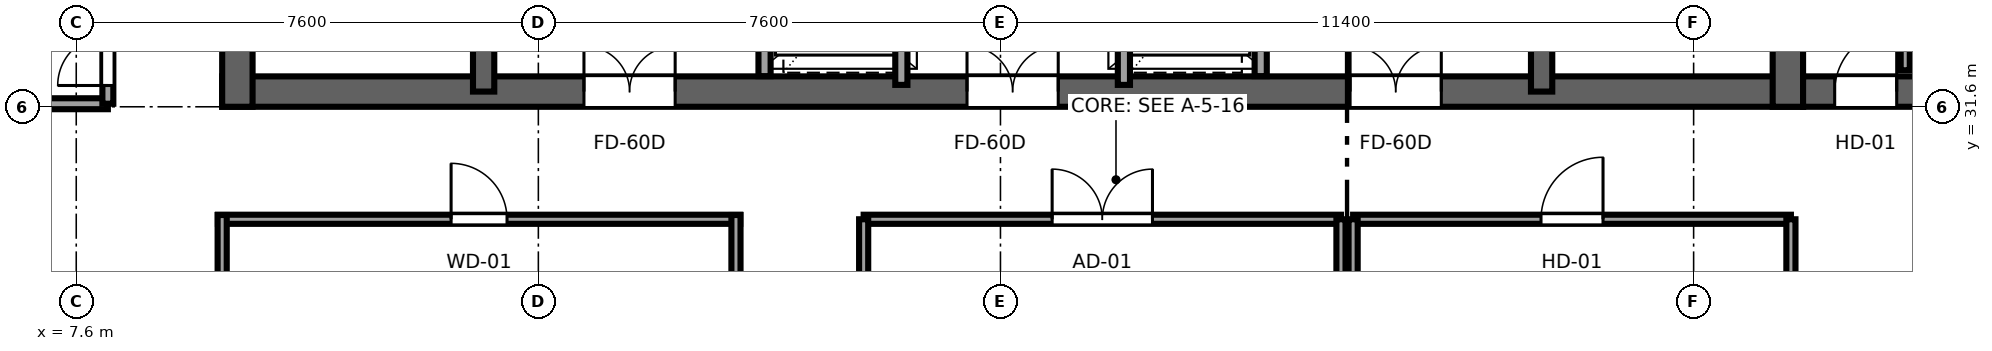
"""IFC4 building model, lengths in metres.
Left out: names, types, materials, properties, quantities, classifications, styles, units other than length and angle.
Written with IfcOpenShell. Run it as: python <this file> out.ifc"""

import sys

from ifc_helpers import new_model, si_unit, direction, frame, frame_2d, origin, place, context, subcontext, project, spatial, rectangle, extrude, source, transform, mapped, element, fill, save


model = new_model("IFC4")
c1 = context("Model", 3, precision=1e-05, world=origin(), true_north=direction((0.0, 1.0)))
c2 = subcontext(c1, "Body", "Model", "MODEL_VIEW")
j1 = project(units=[si_unit("LENGTHUNIT", "METRE"), si_unit("PLANEANGLEUNIT", "RADIAN")], contexts=[c1])
p1 = place(None, origin())
s1 = spatial("IfcSite", under=j1, at=p1, CompositionType="ELEMENT")
p2 = place(p1, origin())
s2 = spatial("IfcBuilding", under=s1, at=p2, CompositionType="ELEMENT")
p3 = place(p2, frame((0.0, 0.0, 238.1)))
s3 = spatial("IfcBuildingStorey", under=s2, at=p3, CompositionType="ELEMENT", Elevation=238.1)
p4 = place(p3, frame((10.0, 31.85, 0.0), z_axis=(0.0, 0.0, 1.0), x_axis=(1.0, 0.0, 0.0)))
e1 = element("IfcWall", 1, at=p4, inside=s3, PredefinedType="SHEAR", context=c2, shape_type="SweptSolid", body=[
    extrude(rectangle(XDim=26.0, YDim=0.5, at=frame_2d((13.0, 0.0))), origin(), (0.0, 0.0, 1.0), 3.55),
])
p5 = place(p4, frame((7.45, 0.0, 0.0), z_axis=(0.0, 0.0, 1.0), x_axis=(-1.0, 0.0, 0.0)))
e2 = element("IfcOpeningElement", 2, at=p5, cuts=e1, PredefinedType="OPENING", context=c2, shape_type="SweptSolid", body=[
    extrude(rectangle(XDim=1.5, YDim=2.04, at=frame_2d((0.75, 1.02))), frame((0.0, 0.26, 0.0), z_axis=(0.0, -1.0, 0.0), x_axis=(1.0, 0.0, 0.0)), (0.0, 0.0, 1.0), 0.52),
])
p6 = place(p4, frame((13.75, 0.0, 0.0), z_axis=(0.0, 0.0, 1.0), x_axis=(-1.0, 0.0, 0.0)))
e3 = element("IfcOpeningElement", 3, at=p6, cuts=e1, PredefinedType="OPENING", context=c2, shape_type="SweptSolid", body=[
    extrude(rectangle(XDim=1.5, YDim=2.04, at=frame_2d((0.75, 1.02))), frame((0.0, 0.26, 0.0), z_axis=(0.0, -1.0, 0.0), x_axis=(1.0, 0.0, 0.0)), (0.0, 0.0, 1.0), 0.52),
])
p7 = place(p4, frame((20.05, 0.0, 0.0), z_axis=(0.0, 0.0, 1.0), x_axis=(-1.0, 0.0, 0.0)))
e4 = element("IfcOpeningElement", 4, at=p7, cuts=e1, PredefinedType="OPENING", context=c2, shape_type="SweptSolid", body=[
    extrude(rectangle(XDim=1.5, YDim=2.04, at=frame_2d((0.75, 1.02))), frame((0.0, 0.26, 0.0), z_axis=(0.0, -1.0, 0.0), x_axis=(1.0, 0.0, 0.0)), (0.0, 0.0, 1.0), 0.52),
])
for number, where, z_axis, x_axis in (
    (5, (10.25, 31.6, 0.0), (0.0, 0.0, 1.0), (0.0, 1.0, 0.0)),
    (6, (35.75, 31.6, 0.0), (0.0, 0.0, 1.0), (0.0, 1.0, 0.0)),
):
    element("IfcWall", number, at=place(p3, frame(where, z_axis=z_axis, x_axis=x_axis)), inside=s3, PredefinedType="SHEAR", context=c2, shape_type="SweptSolid", body=[
        extrude(rectangle(XDim=13.6, YDim=0.5, at=frame_2d((6.8, 0.0))), origin(), (0.0, 0.0, 1.0), 3.55),
    ])
p8 = place(p3, frame((14.3, 31.85, 0.0), z_axis=(0.0, 0.0, 1.0), x_axis=(0.0, 1.0, 0.0)))
e7 = element("IfcWall", 7, at=p8, inside=s3, PredefinedType="SHEAR", context=c2, shape_type="SweptSolid", body=[
    extrude(rectangle(XDim=13.1, YDim=0.35, at=frame_2d((6.55, 0.0))), origin(), (0.0, 0.0, 1.0), 3.55),
])
p9 = place(p8, frame((0.7, 0.0, 0.0)))
e8 = element("IfcOpeningElement", 8, at=p9, cuts=e7, PredefinedType="OPENING", context=c2, shape_type="SweptSolid", body=[
    extrude(rectangle(XDim=1.1, YDim=2.12, at=frame_2d((0.55, 1.06))), frame((0.0, 0.185, 0.0), z_axis=(0.0, -1.0, 0.0), x_axis=(1.0, 0.0, 0.0)), (0.0, 0.0, 1.0), 0.37),
])
p10 = place(p3, frame((31.7, 31.85, 0.0), z_axis=(0.0, 0.0, 1.0), x_axis=(0.0, 1.0, 0.0)))
e9 = element("IfcWall", 9, at=p10, inside=s3, PredefinedType="SHEAR", context=c2, shape_type="SweptSolid", body=[
    extrude(rectangle(XDim=13.1, YDim=0.35, at=frame_2d((6.55, 0.0))), origin(), (0.0, 0.0, 1.0), 3.55),
])
p11 = place(p10, frame((1.8, 0.0, 0.0), z_axis=(0.0, 0.0, 1.0), x_axis=(-1.0, 0.0, 0.0)))
e10 = element("IfcOpeningElement", 10, at=p11, cuts=e9, PredefinedType="OPENING", context=c2, shape_type="SweptSolid", body=[
    extrude(rectangle(XDim=1.1, YDim=2.12, at=frame_2d((0.55, 1.06))), frame((0.0, 0.185, 0.0), z_axis=(0.0, -1.0, 0.0), x_axis=(1.0, 0.0, 0.0)), (0.0, 0.0, 1.0), 0.37),
])
p12 = place(p3, frame((36.0, 31.85, 0.0), z_axis=(0.0, 0.0, 1.0), x_axis=(1.0, 0.0, 0.0)))
e11 = element("IfcWall", 11, at=p12, inside=s3, PredefinedType="SHEAR", context=c2, shape_type="SweptSolid", body=[
    extrude(rectangle(XDim=3.8, YDim=0.5, at=frame_2d((1.9, 0.0))), origin(), (0.0, 0.0, 1.0), 3.55),
])
p13 = place(p12, frame((1.54, 0.0, 0.0), z_axis=(0.0, 0.0, 1.0), x_axis=(-1.0, 0.0, 0.0)))
e12 = element("IfcOpeningElement", 12, at=p13, cuts=e11, PredefinedType="OPENING", context=c2, shape_type="SweptSolid", body=[
    extrude(rectangle(XDim=1.02, YDim=2.03, at=frame_2d((0.51, 1.015))), frame((0.0, 0.26, 0.0), z_axis=(0.0, -1.0, 0.0), x_axis=(1.0, 0.0, 0.0)), (0.0, 0.0, 1.0), 0.52),
])
for number, where, z_axis, x_axis in (
    (13, (18.92, 32.104, 0.0), (0.0, 0.0, 1.0), (0.0, 1.0, 0.0)),
    (14, (27.08, 32.104, 0.0), (0.0, 0.0, 1.0), (0.0, 1.0, 0.0)),
):
    element("IfcWall", number, at=place(p3, frame(where, z_axis=z_axis, x_axis=x_axis)), inside=s3, PredefinedType="SOLIDWALL", context=c2, shape_type="SweptSolid", body=[
        extrude(rectangle(XDim=4.046, YDim=0.2, at=frame_2d((2.023, 0.0))), origin(), (0.0, 0.0, 1.0), 3.29),
    ])
p14 = place(p3, frame((21.17, 31.96, 0.0), z_axis=(0.0, 0.0, 1.0), x_axis=(0.0, 1.0, 0.0)))
e15 = element("IfcWall", 15, at=p14, inside=s3, PredefinedType="SOLIDWALL", context=c2, shape_type="SweptSolid", body=[
    extrude(rectangle(XDim=5.08, YDim=0.2, at=frame_2d((2.54, 0.0))), origin(), (0.0, 0.0, 1.0), 3.29),
])
p15 = place(p14, frame((0.74, 0.0, 0.0)))
e16 = element("IfcOpeningElement", 16, at=p15, cuts=e15, PredefinedType="OPENING", context=c2, shape_type="SweptSolid", body=[
    extrude(rectangle(XDim=1.1, YDim=2.12, at=frame_2d((0.55, 1.06))), frame((0.0, 0.11, 0.0), z_axis=(0.0, -1.0, 0.0), x_axis=(1.0, 0.0, 0.0)), (0.0, 0.0, 1.0), 0.22),
])
p16 = place(p14, frame((3.24, 0.0, 0.0)))
e17 = element("IfcOpeningElement", 17, at=p16, cuts=e15, PredefinedType="OPENING", context=c2, shape_type="SweptSolid", body=[
    extrude(rectangle(XDim=1.1, YDim=2.12, at=frame_2d((0.55, 1.06))), frame((0.0, 0.11, 0.0), z_axis=(0.0, -1.0, 0.0), x_axis=(1.0, 0.0, 0.0)), (0.0, 0.0, 1.0), 0.22),
])
p17 = place(p3, frame((24.83, 31.96, 0.0), z_axis=(0.0, 0.0, 1.0), x_axis=(0.0, 1.0, 0.0)))
e18 = element("IfcWall", 18, at=p17, inside=s3, PredefinedType="SOLIDWALL", context=c2, shape_type="SweptSolid", body=[
    extrude(rectangle(XDim=5.08, YDim=0.2, at=frame_2d((2.54, 0.0))), origin(), (0.0, 0.0, 1.0), 3.29),
])
p18 = place(p17, frame((0.74, 0.0, 0.0)))
e19 = element("IfcOpeningElement", 19, at=p18, cuts=e18, PredefinedType="OPENING", context=c2, shape_type="SweptSolid", body=[
    extrude(rectangle(XDim=1.1, YDim=2.12, at=frame_2d((0.55, 1.06))), frame((0.0, 0.11, 0.0), z_axis=(0.0, -1.0, 0.0), x_axis=(1.0, 0.0, 0.0)), (0.0, 0.0, 1.0), 0.22),
])
p19 = place(p17, frame((3.24, 0.0, 0.0)))
e20 = element("IfcOpeningElement", 20, at=p19, cuts=e18, PredefinedType="OPENING", context=c2, shape_type="SweptSolid", body=[
    extrude(rectangle(XDim=1.1, YDim=2.12, at=frame_2d((0.55, 1.06))), frame((0.0, 0.11, 0.0), z_axis=(0.0, -1.0, 0.0), x_axis=(1.0, 0.0, 0.0)), (0.0, 0.0, 1.0), 0.22),
])
p20 = place(p3, frame((37.68, 32.2, 0.0), z_axis=(0.0, 0.0, 1.0), x_axis=(0.0, 1.0, 0.0)))
e21 = element("IfcWall", 21, at=p20, inside=s3, PredefinedType="PARTITIONING", context=c2, shape_type="SweptSolid", body=[
    extrude(rectangle(XDim=6.0, YDim=0.15, at=frame_2d((3.0, 0.0))), origin(), (0.0, 0.0, 1.0), 3.29),
])
p21 = place(p20, frame((2.49, 0.0, 0.0)))
e22 = element("IfcOpeningElement", 22, at=p21, cuts=e21, PredefinedType="OPENING", context=c2, shape_type="SweptSolid", body=[
    extrude(rectangle(XDim=1.02, YDim=2.03, at=frame_2d((0.51, 1.015))), frame((0.0, 0.085, 0.0), z_axis=(0.0, -1.0, 0.0), x_axis=(1.0, 0.0, 0.0)), (0.0, 0.0, 1.0), 0.17),
])
p22 = place(p3, frame((3.005, 31.65, 0.0), z_axis=(0.0, 0.0, 1.0), x_axis=(1.0, 0.0, 0.0)))
e23 = element("IfcWall", 23, at=p22, inside=s3, PredefinedType="PARTITIONING", context=c2, shape_type="SweptSolid", body=[
    extrude(rectangle(XDim=5.115, YDim=0.18, at=frame_2d((2.558, 0.0))), origin(), (0.0, 0.0, 1.0), 3.29),
])
p23 = place(p3, frame((8.12, 31.65, 0.0), z_axis=(0.0, 0.0, 1.0), x_axis=(0.0, 1.0, 0.0)))
e24 = element("IfcWall", 24, at=p23, inside=s3, PredefinedType="PARTITIONING", context=c2, shape_type="SweptSolid", body=[
    extrude(rectangle(XDim=4.95, YDim=0.18, at=frame_2d((2.475, 0.0))), origin(), (0.0, 0.0, 1.0), 2.08),
])
p24 = place(p23, frame((0.3, 0.0, 0.0)))
e25 = element("IfcOpeningElement", 25, at=p24, cuts=e24, PredefinedType="OPENING", context=c2, shape_type="SweptSolid", body=[
    extrude(rectangle(XDim=1.65, YDim=2.15, at=frame_2d((0.825, 1.075))), frame((0.0, 0.1, 0.0), z_axis=(0.0, -1.0, 0.0), x_axis=(1.0, 0.0, 0.0)), (0.0, 0.0, 1.0), 0.2),
])
p25 = place(p3, frame((9.93, 29.75, 0.0), z_axis=(0.0, 0.0, 1.0), x_axis=(1.0, 0.0, 0.0)))
e26 = element("IfcWall", 26, at=p25, inside=s3, PredefinedType="PARTITIONING", context=c2, shape_type="SweptSolid", body=[
    extrude(rectangle(XDim=8.59, YDim=0.15, at=frame_2d((4.295, 0.0))), origin(), (0.0, 0.0, 1.0), 3.29),
])
p26 = place(p25, frame((3.835, 0.0, 0.0)))
e27 = element("IfcOpeningElement", 27, at=p26, cuts=e26, PredefinedType="OPENING", context=c2, shape_type="SweptSolid", body=[
    extrude(rectangle(XDim=0.92, YDim=2.01, at=frame_2d((0.46, 1.005))), frame((0.0, 0.085, 0.0), z_axis=(0.0, -1.0, 0.0), x_axis=(1.0, 0.0, 0.0)), (0.0, 0.0, 1.0), 0.17),
])
for number, where, z_axis, x_axis in (
    (28, (10.0, 27.03, 0.0), (0.0, 0.0, 1.0), (0.0, 1.0, 0.0)),
    (29, (18.45, 27.03, 0.0), (0.0, 0.0, 1.0), (0.0, 1.0, 0.0)),
):
    element("IfcWall", number, at=place(p3, frame(where, z_axis=z_axis, x_axis=x_axis)), inside=s3, PredefinedType="PARTITIONING", context=c2, shape_type="SweptSolid", body=[
        extrude(rectangle(XDim=2.79, YDim=0.15, at=frame_2d((1.395, 0.0))), origin(), (0.0, 0.0, 1.0), 3.29),
    ])
p27 = place(p3, frame((20.55, 29.75, 0.0), z_axis=(0.0, 0.0, 1.0), x_axis=(1.0, 0.0, 0.0)))
e30 = element("IfcWall", 30, at=p27, inside=s3, PredefinedType="PARTITIONING", context=c2, shape_type="SweptSolid", body=[
    extrude(rectangle(XDim=7.85, YDim=0.15, at=frame_2d((3.925, 0.0))), origin(), (0.0, 0.0, 1.0), 3.29),
])
p28 = place(p27, frame((3.1, 0.0, 0.0)))
e31 = element("IfcOpeningElement", 31, at=p28, cuts=e30, PredefinedType="OPENING", context=c2, shape_type="SweptSolid", body=[
    extrude(rectangle(XDim=1.65, YDim=2.15, at=frame_2d((0.825, 1.075))), frame((0.0, 0.085, 0.0), z_axis=(0.0, -1.0, 0.0), x_axis=(1.0, 0.0, 0.0)), (0.0, 0.0, 1.0), 0.17),
])
p29 = place(p3, frame((20.55, 25.0, 0.0), z_axis=(0.0, 0.0, 1.0), x_axis=(0.0, 1.0, 0.0)))
e32 = element("IfcWall", 32, at=p29, inside=s3, PredefinedType="PARTITIONING", context=c2, shape_type="SweptSolid", body=[
    extrude(rectangle(XDim=4.75, YDim=0.15, at=frame_2d((2.375, 0.0))), origin(), (0.0, 0.0, 1.0), 3.29),
])
p30 = place(p3, frame((28.4, 25.0, 0.0), z_axis=(0.0, 0.0, 1.0), x_axis=(0.0, 1.0, 0.0)))
e33 = element("IfcWall", 33, at=p30, inside=s3, PredefinedType="PARTITIONING", context=c2, shape_type="SweptSolid", body=[
    extrude(rectangle(XDim=4.75, YDim=0.15, at=frame_2d((2.375, 0.0))), origin(), (0.0, 0.0, 1.0), 2.08),
])
p31 = place(p3, frame((28.6, 29.75, 0.0), z_axis=(0.0, 0.0, 1.0), x_axis=(1.0, 0.0, 0.0)))
e34 = element("IfcWall", 34, at=p31, inside=s3, PredefinedType="PARTITIONING", context=c2, shape_type="SweptSolid", body=[
    extrude(rectangle(XDim=7.2, YDim=0.15, at=frame_2d((3.6, 0.0))), origin(), (0.0, 0.0, 1.0), 3.29),
])
p32 = place(p31, frame((3.09, 0.0, 0.0)))
e35 = element("IfcOpeningElement", 35, at=p32, cuts=e34, PredefinedType="OPENING", context=c2, shape_type="SweptSolid", body=[
    extrude(rectangle(XDim=1.02, YDim=2.03, at=frame_2d((0.51, 1.015))), frame((0.0, 0.085, 0.0), z_axis=(0.0, -1.0, 0.0), x_axis=(1.0, 0.0, 0.0)), (0.0, 0.0, 1.0), 0.17),
])
p33 = place(p3, frame((28.6, 25.0, 0.0), z_axis=(0.0, 0.0, 1.0), x_axis=(0.0, 1.0, 0.0)))
e36 = element("IfcWall", 36, at=p33, inside=s3, PredefinedType="PARTITIONING", context=c2, shape_type="SweptSolid", body=[
    extrude(rectangle(XDim=4.75, YDim=0.15, at=frame_2d((2.375, 0.0))), origin(), (0.0, 0.0, 1.0), 2.08),
])
p34 = place(p3, frame((35.8, 25.0, 0.0), z_axis=(0.0, 0.0, 1.0), x_axis=(0.0, 1.0, 0.0)))
e37 = element("IfcWall", 37, at=p34, inside=s3, PredefinedType="PARTITIONING", context=c2, shape_type="SweptSolid", body=[
    extrude(rectangle(XDim=4.75, YDim=0.15, at=frame_2d((2.375, 0.0))), origin(), (0.0, 0.0, 1.0), 3.29),
])
m1 = source(origin(), c2, "Body", "SweptSolid", [
    extrude(rectangle(XDim=1.5, YDim=2.04, at=frame_2d((0.75, 1.02))), frame((0.0, 0.025, 0.0), z_axis=(0.0, -1.0, 0.0), x_axis=(1.0, 0.0, 0.0)), (0.0, 0.0, 1.0), 0.05),
])
p35 = place(p5, origin())
e38 = element("IfcDoor", 38, at=p35, inside=s3, OperationType="DOUBLE_DOOR_SINGLE_SWING", PredefinedType="DOOR", context=c2, shape_type="MappedRepresentation", body=[
    mapped(m1, transform((0.0, 0.0, 0.0), x_axis=(1.0, 0.0, 0.0), y_axis=(0.0, 1.0, 0.0), z_axis=(0.0, 0.0, 1.0), scale=1.0)),
])
fill(e2, e38)
p36 = place(p6, origin())
e39 = element("IfcDoor", 39, at=p36, inside=s3, OperationType="DOUBLE_DOOR_SINGLE_SWING", PredefinedType="DOOR", context=c2, shape_type="MappedRepresentation", body=[
    mapped(m1, transform((0.0, 0.0, 0.0), x_axis=(1.0, 0.0, 0.0), y_axis=(0.0, 1.0, 0.0), z_axis=(0.0, 0.0, 1.0), scale=1.0)),
])
fill(e3, e39)
p37 = place(p7, origin())
e40 = element("IfcDoor", 40, at=p37, inside=s3, OperationType="DOUBLE_DOOR_SINGLE_SWING", PredefinedType="DOOR", context=c2, shape_type="MappedRepresentation", body=[
    mapped(m1, transform((0.0, 0.0, 0.0), x_axis=(1.0, 0.0, 0.0), y_axis=(0.0, 1.0, 0.0), z_axis=(0.0, 0.0, 1.0), scale=1.0)),
])
fill(e4, e40)
m2 = source(origin(), c2, "Body", "SweptSolid", [
    extrude(rectangle(XDim=1.02, YDim=2.03, at=frame_2d((0.51, 1.015))), frame((0.0, 0.025, 0.0), z_axis=(0.0, -1.0, 0.0), x_axis=(1.0, 0.0, 0.0)), (0.0, 0.0, 1.0), 0.05),
])
p38 = place(p13, origin())
e41 = element("IfcDoor", 41, at=p38, inside=s3, OperationType="SINGLE_SWING_RIGHT", PredefinedType="DOOR", context=c2, shape_type="MappedRepresentation", body=[
    mapped(m2, transform((0.0, 0.0, 0.0), x_axis=(1.0, 0.0, 0.0), y_axis=(0.0, 1.0, 0.0), z_axis=(0.0, 0.0, 1.0), scale=1.0)),
])
fill(e12, e41)
m3 = source(origin(), c2, "Body", "SweptSolid", [
    extrude(rectangle(XDim=1.65, YDim=2.15, at=frame_2d((0.825, 1.075))), frame((0.0, 0.025, 0.0), z_axis=(0.0, -1.0, 0.0), x_axis=(1.0, 0.0, 0.0)), (0.0, 0.0, 1.0), 0.05),
])
p39 = place(p24, origin())
e42 = element("IfcDoor", 42, at=p39, inside=s3, OperationType="DOUBLE_DOOR_SINGLE_SWING", PredefinedType="DOOR", context=c2, shape_type="MappedRepresentation", body=[
    mapped(m3, transform((0.0, 0.0, 0.0), x_axis=(1.0, 0.0, 0.0), y_axis=(0.0, 1.0, 0.0), z_axis=(0.0, 0.0, 1.0), scale=1.0)),
])
fill(e25, e42)
m4 = source(origin(), c2, "Body", "SweptSolid", [
    extrude(rectangle(XDim=0.92, YDim=2.01, at=frame_2d((0.46, 1.005))), frame((0.0, 0.025, 0.0), z_axis=(0.0, -1.0, 0.0), x_axis=(1.0, 0.0, 0.0)), (0.0, 0.0, 1.0), 0.05),
])
p40 = place(p26, origin())
e43 = element("IfcDoor", 43, at=p40, inside=s3, OperationType="SINGLE_SWING_LEFT", PredefinedType="DOOR", context=c2, shape_type="MappedRepresentation", body=[
    mapped(m4, transform((0.0, 0.0, 0.0), x_axis=(1.0, 0.0, 0.0), y_axis=(0.0, 1.0, 0.0), z_axis=(0.0, 0.0, 1.0), scale=1.0)),
])
fill(e27, e43)
p41 = place(p28, origin())
e44 = element("IfcDoor", 44, at=p41, inside=s3, OperationType="DOUBLE_DOOR_SINGLE_SWING", PredefinedType="DOOR", context=c2, shape_type="MappedRepresentation", body=[
    mapped(m3, transform((0.0, 0.0, 0.0), x_axis=(1.0, 0.0, 0.0), y_axis=(0.0, 1.0, 0.0), z_axis=(0.0, 0.0, 1.0), scale=1.0)),
])
fill(e31, e44)
p42 = place(p32, origin())
e45 = element("IfcDoor", 45, at=p42, inside=s3, OperationType="SINGLE_SWING_RIGHT", PredefinedType="DOOR", context=c2, shape_type="MappedRepresentation", body=[
    mapped(m2, transform((0.0, 0.0, 0.0), x_axis=(1.0, 0.0, 0.0), y_axis=(0.0, 1.0, 0.0), z_axis=(0.0, 0.0, 1.0), scale=1.0)),
])
fill(e35, e45)
save(model, sys.argv[1])
